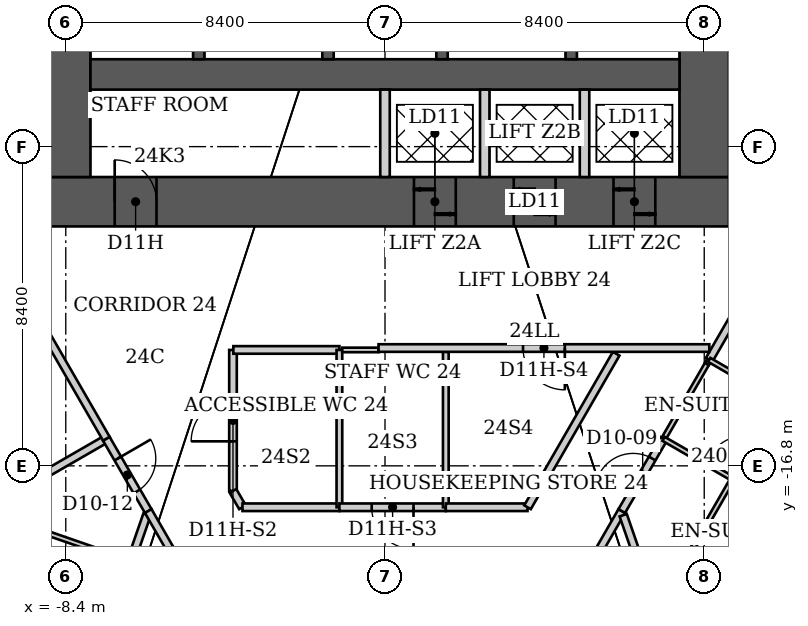
"""IFC4 building model, lengths in metres.
Left out: names, types, materials, properties, quantities, classifications, styles, units other than length and angle.
Written with IfcOpenShell. Run it as: python <this file> out.ifc"""

import sys

from ifc_helpers import new_model, si_unit, direction, frame, frame_2d, origin, place, context, subcontext, project, spatial, rectangle, extrude, element, fill, save


model = new_model("IFC4")
c1 = context("Model", 3, precision=1e-05, world=origin(), true_north=direction((0.0, 1.0)))
c2 = subcontext(c1, "Body", "Model", "MODEL_VIEW")
j1 = project(units=[si_unit("LENGTHUNIT", "METRE"), si_unit("PLANEANGLEUNIT", "RADIAN")], contexts=[c1])
p1 = place(None, origin())
s1 = spatial("IfcSite", under=j1, at=p1, CompositionType="ELEMENT")
p2 = place(p1, origin())
s2 = spatial("IfcBuilding", under=s1, at=p2, CompositionType="ELEMENT")
p3 = place(p2, frame((0.0, 0.0, 100.6)))
s3 = spatial("IfcBuildingStorey", under=s2, at=p3, CompositionType="ELEMENT", Elevation=100.6)
p4 = place(p3, frame((-9.05, -9.85, 0.0), z_axis=(0.0, 0.0, 1.0), x_axis=(1.0, 0.0, 0.0)))
e1 = element("IfcWall", 1, at=p4, inside=s3, PredefinedType="SHEAR", context=c2, shape_type="SweptSolid", body=[
    extrude(rectangle(XDim=18.1, YDim=1.3, at=frame_2d((9.05, 0.0))), origin(), (0.0, 0.0, 1.0), 3.8),
])
p5 = place(p4, frame((1.938, 0.0, 0.0)))
e2 = element("IfcOpeningElement", 2, at=p5, cuts=e1, PredefinedType="OPENING", context=c2, shape_type="SweptSolid", body=[
    extrude(rectangle(XDim=1.1, YDim=2.2, at=frame_2d((0.55, 1.1))), frame((0.0, 0.65, 0.0), z_axis=(0.0, -1.0, 0.0), x_axis=(1.0, 0.0, 0.0)), (0.0, 0.0, 1.0), 1.3),
])
p6 = place(p4, frame((9.812, 0.0, 0.0)))
e3 = element("IfcOpeningElement", 3, at=p6, cuts=e1, PredefinedType="OPENING", context=c2, shape_type="SweptSolid", body=[
    extrude(rectangle(XDim=1.1, YDim=2.1, at=frame_2d((0.55, 1.05))), frame((0.0, 0.65, 0.0), z_axis=(0.0, -1.0, 0.0), x_axis=(1.0, 0.0, 0.0)), (0.0, 0.0, 1.0), 1.3),
])
p7 = place(p4, frame((12.438, 0.0, 0.0)))
e4 = element("IfcOpeningElement", 4, at=p7, cuts=e1, PredefinedType="OPENING", context=c2, shape_type="SweptSolid", body=[
    extrude(rectangle(XDim=1.1, YDim=2.1, at=frame_2d((0.55, 1.05))), frame((0.0, 0.65, 0.0), z_axis=(0.0, -1.0, 0.0), x_axis=(1.0, 0.0, 0.0)), (0.0, 0.0, 1.0), 1.3),
])
p8 = place(p4, frame((15.062, 0.0, 0.0)))
e5 = element("IfcOpeningElement", 5, at=p8, cuts=e1, PredefinedType="OPENING", context=c2, shape_type="SweptSolid", body=[
    extrude(rectangle(XDim=1.1, YDim=2.1, at=frame_2d((0.55, 1.05))), frame((0.0, 0.65, 0.0), z_axis=(0.0, -1.0, 0.0), x_axis=(1.0, 0.0, 0.0)), (0.0, 0.0, 1.0), 1.3),
])
p9 = place(p3, frame((-8.4, -9.2, 0.0), z_axis=(0.0, 0.0, 1.0), x_axis=(0.0, 1.0, 0.0)))
e6 = element("IfcWall", 6, at=p9, inside=s3, PredefinedType="SHEAR", context=c2, shape_type="SweptSolid", body=[
    extrude(rectangle(XDim=15.3, YDim=1.3, at=frame_2d((7.65, 0.0))), origin(), (0.0, 0.0, 1.0), 3.8),
])
p10 = place(p9, frame((10.7, 0.0, 0.0)))
e7 = element("IfcOpeningElement", 7, at=p10, cuts=e6, PredefinedType="OPENING", context=c2, shape_type="SweptSolid", body=[
    extrude(rectangle(XDim=1.2, YDim=2.2, at=frame_2d((0.6, 1.1))), frame((0.0, 0.65, 0.0), z_axis=(0.0, -1.0, 0.0), x_axis=(1.0, 0.0, 0.0)), (0.0, 0.0, 1.0), 1.3),
])
p11 = place(p3, frame((8.4, -9.2, 0.0), z_axis=(0.0, 0.0, 1.0), x_axis=(0.0, 1.0, 0.0)))
e8 = element("IfcWall", 8, at=p11, inside=s3, PredefinedType="SHEAR", context=c2, shape_type="SweptSolid", body=[
    extrude(rectangle(XDim=15.3, YDim=1.3, at=frame_2d((7.65, 0.0))), origin(), (0.0, 0.0, 1.0), 3.8),
])
p12 = place(p11, frame((10.7, 0.0, 0.0)))
e9 = element("IfcOpeningElement", 9, at=p12, cuts=e8, PredefinedType="OPENING", context=c2, shape_type="SweptSolid", body=[
    extrude(rectangle(XDim=1.2, YDim=2.2, at=frame_2d((0.6, 1.1))), frame((0.0, 0.65, 0.0), z_axis=(0.0, -1.0, 0.0), x_axis=(1.0, 0.0, 0.0)), (0.0, 0.0, 1.0), 1.3),
])
p13 = place(p3, frame((-7.75, -6.5, 0.0), z_axis=(0.0, 0.0, 1.0), x_axis=(1.0, 0.0, 0.0)))
e10 = element("IfcWall", 10, at=p13, inside=s3, PredefinedType="SHEAR", context=c2, shape_type="SweptSolid", body=[
    extrude(rectangle(XDim=15.5, YDim=0.8, at=frame_2d((7.75, 0.0))), origin(), (0.0, 0.0, 1.0), 3.8),
])
for number, where, z_axis, x_axis in (
    (11, (-4.9, -6.1, 0.0), (0.0, 0.0, 1.0), (0.0, 1.0, 0.0)),
    (12, (-1.5, -6.1, 0.0), (0.0, 0.0, 1.0), (0.0, 1.0, 0.0)),
    (13, (1.5, -6.1, 0.0), (0.0, 0.0, 1.0), (0.0, 1.0, 0.0)),
    (14, (4.9, -6.1, 0.0), (0.0, 0.0, 1.0), (0.0, 1.0, 0.0)),
):
    element("IfcWall", number, at=place(p3, frame(where, z_axis=z_axis, x_axis=x_axis)), inside=s3, PredefinedType="SHEAR", context=c2, shape_type="SweptSolid", body=[
        extrude(rectangle(XDim=7.2, YDim=0.3, at=frame_2d((3.6, 0.0))), origin(), (0.0, 0.0, 1.0), 3.8),
    ])
for number, where, z_axis, x_axis in (
    (15, (0.0, -9.2, 0.0), (0.0, 0.0, 1.0), (0.0, 1.0, 0.0)),
    (16, (2.625, -9.2, 0.0), (0.0, 0.0, 1.0), (0.0, 1.0, 0.0)),
    (17, (5.25, -9.2, 0.0), (0.0, 0.0, 1.0), (0.0, 1.0, 0.0)),
):
    element("IfcWall", number, at=place(p3, frame(where, z_axis=z_axis, x_axis=x_axis)), inside=s3, PredefinedType="PARTITIONING", context=c2, shape_type="SweptSolid", body=[
        extrude(rectangle(XDim=2.3, YDim=0.25, at=frame_2d((1.15, 0.0))), origin(), (0.0, 0.0, 1.0), 3.8),
    ])
p14 = place(p3, frame((-14.246, -20.08, 0.0), z_axis=(0.0, 0.0, 1.0), x_axis=(0.866178955952, 0.49973394548, 0.0)))
e18 = element("IfcWall", 18, at=p14, inside=s3, PredefinedType="PARTITIONING", context=c2, shape_type="SweptSolid", body=[
    extrude(rectangle(XDim=7.969, YDim=0.2, at=frame_2d((3.985, 0.0))), origin(), (0.0, 0.0, 1.0), 3.64),
])
p15 = place(p3, frame((-9.61, -12.14, 0.0), z_axis=(0.0, 0.0, 1.0), x_axis=(0.499898533245, -0.866083977718, 0.0)))
e19 = element("IfcWall", 19, at=p15, inside=s3, PredefinedType="PARTITIONING", context=c2, shape_type="SweptSolid", body=[
    extrude(rectangle(XDim=4.561, YDim=0.2, at=frame_2d((2.281, 0.0))), origin(), (0.0, 0.0, 1.0), 3.64),
])
p16 = place(p3, frame((-7.331, -16.091, 0.0), z_axis=(0.0, 0.0, 1.0), x_axis=(0.501518373175, -0.865146994081, 0.0)))
e20 = element("IfcWall", 20, at=p16, inside=s3, PredefinedType="PARTITIONING", context=c2, shape_type="SweptSolid", body=[
    extrude(rectangle(XDim=2.196, YDim=0.2, at=frame_2d((1.098, 0.0))), origin(), (0.0, 0.0, 1.0), 3.64),
])
p17 = place(p16, frame((0.598, 0.0, 0.0)))
e21 = element("IfcOpeningElement", 21, at=p17, cuts=e20, PredefinedType="OPENING", context=c2, shape_type="SweptSolid", body=[
    extrude(rectangle(XDim=1.0, YDim=2.13, at=frame_2d((0.5, 1.065))), frame((0.0, 0.1, 0.0), z_axis=(0.0, -1.0, 0.0), x_axis=(1.0, 0.0, 0.0)), (0.0, 0.0, 1.0), 0.2),
])
p18 = place(p3, frame((-6.7, -19.33, 0.0), z_axis=(0.0, 0.0, 1.0), x_axis=(-0.944753042377, 0.327782990589, 0.0)))
e22 = element("IfcWall", 22, at=p18, inside=s3, PredefinedType="PARTITIONING", context=c2, shape_type="SweptSolid", body=[
    extrude(rectangle(XDim=2.594, YDim=0.12, at=frame_2d((1.297, 0.0))), origin(), (0.0, 0.0, 1.0), 3.64),
])
p19 = place(p3, frame((-6.696, -19.331, 0.0), z_axis=(0.0, 0.0, 1.0), x_axis=(0.328298231075, 0.944574121746, 0.0)))
e23 = element("IfcWall", 23, at=p19, inside=s3, PredefinedType="PARTITIONING", context=c2, shape_type="SweptSolid", body=[
    extrude(rectangle(XDim=1.32, YDim=0.2, at=frame_2d((0.66, 0.0))), origin(), (0.0, 0.0, 1.0), 3.64),
])
p20 = place(p3, frame((-6.23, -17.99, 0.0), z_axis=(0.0, 0.0, 1.0), x_axis=(0.499431599995, -0.866353321068, 0.0)))
e24 = element("IfcWall", 24, at=p20, inside=s3, PredefinedType="PARTITIONING", context=c2, shape_type="SweptSolid", body=[
    extrude(rectangle(XDim=1.962, YDim=0.2, at=frame_2d((0.981, 0.0))), origin(), (0.0, 0.0, 1.0), 3.64),
])
p21 = place(p3, frame((-4.0, -17.46, 0.0), z_axis=(0.0, 0.0, 1.0), x_axis=(0.0, 1.0, 0.0)))
e25 = element("IfcWall", 25, at=p21, inside=s3, PredefinedType="PARTITIONING", context=c2, shape_type="SweptSolid", body=[
    extrude(rectangle(XDim=3.71, YDim=0.2, at=frame_2d((1.855, 0.0))), origin(), (0.0, 0.0, 1.0), 2.878),
])
p22 = place(p21, frame((1.305, 0.0, 0.0)))
e26 = element("IfcOpeningElement", 26, at=p22, cuts=e25, PredefinedType="OPENING", context=c2, shape_type="SweptSolid", body=[
    extrude(rectangle(XDim=1.1, YDim=2.2, at=frame_2d((0.55, 1.1))), frame((0.0, 0.1, 0.0), z_axis=(0.0, -1.0, 0.0), x_axis=(1.0, 0.0, 0.0)), (0.0, 0.0, 1.0), 0.2),
])
p23 = place(p3, frame((-3.99, -13.75, 0.0), z_axis=(0.0, 0.0, 1.0), x_axis=(1.0, 0.0, 0.0)))
e27 = element("IfcWall", 27, at=p23, inside=s3, PredefinedType="PARTITIONING", context=c2, shape_type="SweptSolid", body=[
    extrude(rectangle(XDim=2.79, YDim=0.2, at=frame_2d((1.395, 0.0))), origin(), (0.0, 0.0, 1.0), 3.64),
])
p24 = place(p3, frame((-3.75, -17.89, 0.0), z_axis=(0.0, 0.0, 1.0), x_axis=(-0.502680181512, 0.864472460588, 0.0)))
e28 = element("IfcWall", 28, at=p24, inside=s3, PredefinedType="PARTITIONING", context=c2, shape_type="SweptSolid", body=[
    extrude(rectangle(XDim=0.497, YDim=0.2, at=frame_2d((0.249, 0.0))), origin(), (0.0, 0.0, 1.0), 3.64),
])
p25 = place(p3, frame((-1.2, -17.89, 0.0), z_axis=(0.0, 0.0, 1.0), x_axis=(-1.0, 0.0, 0.0)))
e29 = element("IfcWall", 29, at=p25, inside=s3, PredefinedType="PARTITIONING", context=c2, shape_type="SweptSolid", body=[
    extrude(rectangle(XDim=2.55, YDim=0.2, at=frame_2d((1.275, 0.0))), origin(), (0.0, 0.0, 1.0), 3.64),
])
p26 = place(p3, frame((-1.2, -13.75, 0.0), z_axis=(0.0, 0.0, 1.0), x_axis=(0.0, -1.0, 0.0)))
e30 = element("IfcWall", 30, at=p26, inside=s3, PredefinedType="PARTITIONING", context=c2, shape_type="SweptSolid", body=[
    extrude(rectangle(XDim=4.14, YDim=0.15, at=frame_2d((2.07, 0.0))), origin(), (0.0, 0.0, 1.0), 3.64),
])
p27 = place(p3, frame((-1.125, -13.75, 0.0), z_axis=(0.0, 0.0, 1.0), x_axis=(1.0, 0.0, 0.0)))
e31 = element("IfcWall", 31, at=p27, inside=s3, PredefinedType="PARTITIONING", context=c2, shape_type="SweptSolid", body=[
    extrude(rectangle(XDim=0.955, YDim=0.12, at=frame_2d((0.478, 0.0))), origin(), (0.0, 0.0, 1.0), 3.64),
])
p28 = place(p3, frame((1.6, -17.89, 0.0), z_axis=(0.0, 0.0, 1.0), x_axis=(-1.0, 0.0, 0.0)))
e32 = element("IfcWall", 32, at=p28, inside=s3, PredefinedType="PARTITIONING", context=c2, shape_type="SweptSolid", body=[
    extrude(rectangle(XDim=2.8, YDim=0.2, at=frame_2d((1.4, 0.0))), origin(), (0.0, 0.0, 1.0), 3.64),
])
p29 = place(p28, frame((0.85, 0.0, 0.0)))
e33 = element("IfcOpeningElement", 33, at=p29, cuts=e32, PredefinedType="OPENING", context=c2, shape_type="SweptSolid", body=[
    extrude(rectangle(XDim=1.1, YDim=2.2, at=frame_2d((0.55, 1.1))), frame((0.0, 0.1, 0.0), z_axis=(0.0, -1.0, 0.0), x_axis=(1.0, 0.0, 0.0)), (0.0, 0.0, 1.0), 0.2),
])
p30 = place(p3, frame((1.6, -13.8, 0.0), z_axis=(0.0, 0.0, 1.0), x_axis=(0.0, -1.0, 0.0)))
e34 = element("IfcWall", 34, at=p30, inside=s3, PredefinedType="PARTITIONING", context=c2, shape_type="SweptSolid", body=[
    extrude(rectangle(XDim=4.09, YDim=0.15, at=frame_2d((2.045, 0.0))), origin(), (0.0, 0.0, 1.0), 3.64),
])
p31 = place(p3, frame((3.75, -17.89, 0.0), z_axis=(0.0, 0.0, 1.0), x_axis=(-1.0, 0.0, 0.0)))
e35 = element("IfcWall", 35, at=p31, inside=s3, PredefinedType="PARTITIONING", context=c2, shape_type="SweptSolid", body=[
    extrude(rectangle(XDim=2.15, YDim=0.2, at=frame_2d((1.075, 0.0))), origin(), (0.0, 0.0, 1.0), 3.64),
])
p32 = place(p3, frame((5.25, -19.69, 0.0), z_axis=(0.0, 0.0, 1.0), x_axis=(0.499431599995, 0.866353321068, 0.0)))
e36 = element("IfcWall", 36, at=p32, inside=s3, PredefinedType="PARTITIONING", context=c2, shape_type="SweptSolid", body=[
    extrude(rectangle(XDim=1.962, YDim=0.2, at=frame_2d((0.981, 0.0))), origin(), (0.0, 0.0, 1.0), 3.64),
])
p33 = place(p3, frame((6.083, -13.85, 0.0), z_axis=(0.0, 0.0, 1.0), x_axis=(-0.499977643516, -0.866038310922, 0.0)))
e37 = element("IfcWall", 37, at=p33, inside=s3, PredefinedType="PARTITIONING", context=c2, shape_type="SweptSolid", body=[
    extrude(rectangle(XDim=4.665, YDim=0.2, at=frame_2d((2.333, 0.0))), origin(), (0.0, 0.0, 1.0), 3.64),
])
p34 = place(p3, frame((6.23, -17.99, 0.0), z_axis=(0.0, 0.0, 1.0), x_axis=(0.501088872721, 0.865395829453, 0.0)))
e38 = element("IfcWall", 38, at=p34, inside=s3, PredefinedType="PARTITIONING", context=c2, shape_type="SweptSolid", body=[
    extrude(rectangle(XDim=2.195, YDim=0.2, at=frame_2d((1.098, 0.0))), origin(), (0.0, 0.0, 1.0), 3.64),
])
p35 = place(p34, frame((0.598, 0.0, 0.0)))
e39 = element("IfcOpeningElement", 39, at=p35, cuts=e38, PredefinedType="OPENING", context=c2, shape_type="SweptSolid", body=[
    extrude(rectangle(XDim=1.0, YDim=2.13, at=frame_2d((0.5, 1.065))), frame((0.0, 0.1, 0.0), z_axis=(0.0, -1.0, 0.0), x_axis=(1.0, 0.0, 0.0)), (0.0, 0.0, 1.0), 0.2),
])
p36 = place(p3, frame((6.268, -18.099, 0.0), z_axis=(0.0, 0.0, 1.0), x_axis=(0.327257488288, -0.944935202202, 0.0)))
e40 = element("IfcWall", 40, at=p36, inside=s3, PredefinedType="PARTITIONING", context=c2, shape_type="SweptSolid", body=[
    extrude(rectangle(XDim=2.054, YDim=0.2, at=frame_2d((1.027, 0.0))), origin(), (0.0, 0.0, 1.0), 3.64),
])
p37 = place(p3, frame((7.33, -16.09, 0.0), z_axis=(0.0, 0.0, 1.0), x_axis=(0.500786797394, 0.865570669302, 0.0)))
e41 = element("IfcWall", 41, at=p37, inside=s3, PredefinedType="PARTITIONING", context=c2, shape_type="SweptSolid", body=[
    extrude(rectangle(XDim=2.276, YDim=0.12, at=frame_2d((1.138, 0.0))), origin(), (0.0, 0.0, 1.0), 3.64),
])
p38 = place(p3, frame((7.33, -16.09, 0.0), z_axis=(0.0, 0.0, 1.0), x_axis=(0.86618365172, -0.499725806311, 0.0)))
e42 = element("IfcWall", 42, at=p38, inside=s3, PredefinedType="PARTITIONING", context=c2, shape_type="SweptSolid", body=[
    extrude(rectangle(XDim=2.101, YDim=0.12, at=frame_2d((1.051, 0.0))), origin(), (0.0, 0.0, 1.0), 3.64),
])
p39 = place(p3, frame((8.47, -14.12, 0.0), z_axis=(0.0, 0.0, 1.0), x_axis=(0.478852130681, 0.877895572914, 0.0)))
e43 = element("IfcWall", 43, at=p39, inside=s3, PredefinedType="PARTITIONING", context=c2, shape_type="SweptSolid", body=[
    extrude(rectangle(XDim=0.125, YDim=0.12, at=frame_2d((0.063, 0.0))), origin(), (0.0, 0.0, 1.0), 3.64),
])
p40 = place(p3, frame((8.53, -14.01, 0.0), z_axis=(0.0, 0.0, 1.0), x_axis=(0.500072306674, 0.865983653482, 0.0)))
e44 = element("IfcWall", 44, at=p40, inside=s3, PredefinedType="PARTITIONING", context=c2, shape_type="SweptSolid", body=[
    extrude(rectangle(XDim=8.719, YDim=0.2, at=frame_2d((4.359, 0.0))), origin(), (0.0, 0.0, 1.0), 3.64),
])
p41 = place(p40, frame((3.859, 0.0, 0.0)))
e45 = element("IfcOpeningElement", 45, at=p41, cuts=e44, PredefinedType="OPENING", context=c2, shape_type="SweptSolid", body=[
    extrude(rectangle(XDim=1.0, YDim=2.13, at=frame_2d((0.5, 1.065))), frame((0.0, 0.1, 0.0), z_axis=(0.0, -1.0, 0.0), x_axis=(1.0, 0.0, 0.0)), (0.0, 0.0, 1.0), 0.2),
])
p42 = place(p3, frame((8.534, -13.7, 0.0), z_axis=(0.0, 0.0, 1.0), x_axis=(-1.0, 0.0, 0.0)))
e46 = element("IfcWall", 46, at=p42, inside=s3, PredefinedType="PARTITIONING", context=c2, shape_type="SweptSolid", body=[
    extrude(rectangle(XDim=8.704, YDim=0.2, at=frame_2d((4.352, 0.0))), origin(), (0.0, 0.0, 1.0), 3.64),
])
p43 = place(p42, frame((3.802, 0.0, 0.0)))
e47 = element("IfcOpeningElement", 47, at=p43, cuts=e46, PredefinedType="OPENING", context=c2, shape_type="SweptSolid", body=[
    extrude(rectangle(XDim=1.1, YDim=2.2, at=frame_2d((0.55, 1.1))), frame((0.0, 0.1, 0.0), z_axis=(0.0, -1.0, 0.0), x_axis=(1.0, 0.0, 0.0)), (0.0, 0.0, 1.0), 0.2),
])
p44 = place(p3, frame((9.15, -17.14, 0.0), z_axis=(0.0, 0.0, 1.0), x_axis=(-0.499338582192, -0.866406936915, 0.0)))
e48 = element("IfcWall", 48, at=p44, inside=s3, PredefinedType="PARTITIONING", context=c2, shape_type="SweptSolid", body=[
    extrude(rectangle(XDim=2.643, YDim=0.12, at=frame_2d((1.322, 0.0))), origin(), (0.0, 0.0, 1.0), 3.64),
])
p45 = place(p3, frame((10.44, -15.12, 0.0), z_axis=(0.0, 0.0, 1.0), x_axis=(-0.864567486339, 0.502516727647, 0.0)))
e49 = element("IfcWall", 49, at=p45, inside=s3, PredefinedType="PARTITIONING", context=c2, shape_type="SweptSolid", body=[
    extrude(rectangle(XDim=2.209, YDim=0.12, at=frame_2d((1.104, 0.0))), origin(), (0.0, 0.0, 1.0), 3.023),
])
p46 = place(p35, origin())
e50 = element("IfcDoor", 50, at=p46, inside=s3, OperationType="SINGLE_SWING_LEFT", PredefinedType="DOOR", context=c2, shape_type="SweptSolid", body=[
    extrude(rectangle(XDim=1.0, YDim=2.13, at=frame_2d((0.5, 1.065))), frame((0.0, 0.025, 0.0), z_axis=(0.0, -1.0, 0.0), x_axis=(1.0, 0.0, 0.0)), (0.0, 0.0, 1.0), 0.05),
])
fill(e39, e50)
p47 = place(p17, origin())
e51 = element("IfcDoor", 51, at=p47, inside=s3, OperationType="SINGLE_SWING_LEFT", PredefinedType="DOOR", context=c2, shape_type="SweptSolid", body=[
    extrude(rectangle(XDim=1.0, YDim=2.13, at=frame_2d((0.5, 1.065))), frame((0.0, 0.025, 0.0), z_axis=(0.0, -1.0, 0.0), x_axis=(1.0, 0.0, 0.0)), (0.0, 0.0, 1.0), 0.05),
])
fill(e21, e51)
p48 = place(p22, origin())
e52 = element("IfcDoor", 52, at=p48, inside=s3, OperationType="SINGLE_SWING_LEFT", PredefinedType="DOOR", context=c2, shape_type="SweptSolid", body=[
    extrude(rectangle(XDim=1.1, YDim=2.2, at=frame_2d((0.55, 1.1))), frame((0.0, 0.025, 0.0), z_axis=(0.0, -1.0, 0.0), x_axis=(1.0, 0.0, 0.0)), (0.0, 0.0, 1.0), 0.05),
])
fill(e26, e52)
p49 = place(p29, origin())
e53 = element("IfcDoor", 53, at=p49, inside=s3, OperationType="SINGLE_SWING_LEFT", PredefinedType="DOOR", context=c2, shape_type="SweptSolid", body=[
    extrude(rectangle(XDim=1.1, YDim=2.2, at=frame_2d((0.55, 1.1))), frame((0.0, 0.025, 0.0), z_axis=(0.0, -1.0, 0.0), x_axis=(1.0, 0.0, 0.0)), (0.0, 0.0, 1.0), 0.05),
])
fill(e33, e53)
p50 = place(p43, origin())
e54 = element("IfcDoor", 54, at=p50, inside=s3, OperationType="SINGLE_SWING_LEFT", PredefinedType="DOOR", context=c2, shape_type="SweptSolid", body=[
    extrude(rectangle(XDim=1.1, YDim=2.2, at=frame_2d((0.55, 1.1))), frame((0.0, 0.025, 0.0), z_axis=(0.0, -1.0, 0.0), x_axis=(1.0, 0.0, 0.0)), (0.0, 0.0, 1.0), 0.05),
])
fill(e47, e54)
p51 = place(p5, origin())
e55 = element("IfcDoor", 55, at=p51, inside=s3, OperationType="SINGLE_SWING_LEFT", PredefinedType="DOOR", context=c2, shape_type="SweptSolid", body=[
    extrude(rectangle(XDim=1.1, YDim=2.2, at=frame_2d((0.55, 1.1))), frame((0.0, 0.025, 0.0), z_axis=(0.0, -1.0, 0.0), x_axis=(1.0, 0.0, 0.0)), (0.0, 0.0, 1.0), 0.05),
])
fill(e2, e55)
p52 = place(p6, origin())
e56 = element("IfcDoor", 56, at=p52, inside=s3, OperationType="DOUBLE_DOOR_SLIDING", PredefinedType="DOOR", context=c2, shape_type="SweptSolid", body=[
    extrude(rectangle(XDim=1.1, YDim=2.1, at=frame_2d((0.55, 1.05))), frame((0.0, 0.025, 0.0), z_axis=(0.0, -1.0, 0.0), x_axis=(1.0, 0.0, 0.0)), (0.0, 0.0, 1.0), 0.05),
])
fill(e3, e56)
p53 = place(p7, origin())
e57 = element("IfcDoor", 57, at=p53, inside=s3, OperationType="DOUBLE_DOOR_SLIDING", PredefinedType="DOOR", context=c2, shape_type="SweptSolid", body=[
    extrude(rectangle(XDim=1.1, YDim=2.1, at=frame_2d((0.55, 1.05))), frame((0.0, 0.025, 0.0), z_axis=(0.0, -1.0, 0.0), x_axis=(1.0, 0.0, 0.0)), (0.0, 0.0, 1.0), 0.05),
])
fill(e4, e57)
p54 = place(p8, origin())
e58 = element("IfcDoor", 58, at=p54, inside=s3, OperationType="DOUBLE_DOOR_SLIDING", PredefinedType="DOOR", context=c2, shape_type="SweptSolid", body=[
    extrude(rectangle(XDim=1.1, YDim=2.1, at=frame_2d((0.55, 1.05))), frame((0.0, 0.025, 0.0), z_axis=(0.0, -1.0, 0.0), x_axis=(1.0, 0.0, 0.0)), (0.0, 0.0, 1.0), 0.05),
])
fill(e5, e58)
save(model, sys.argv[1])
